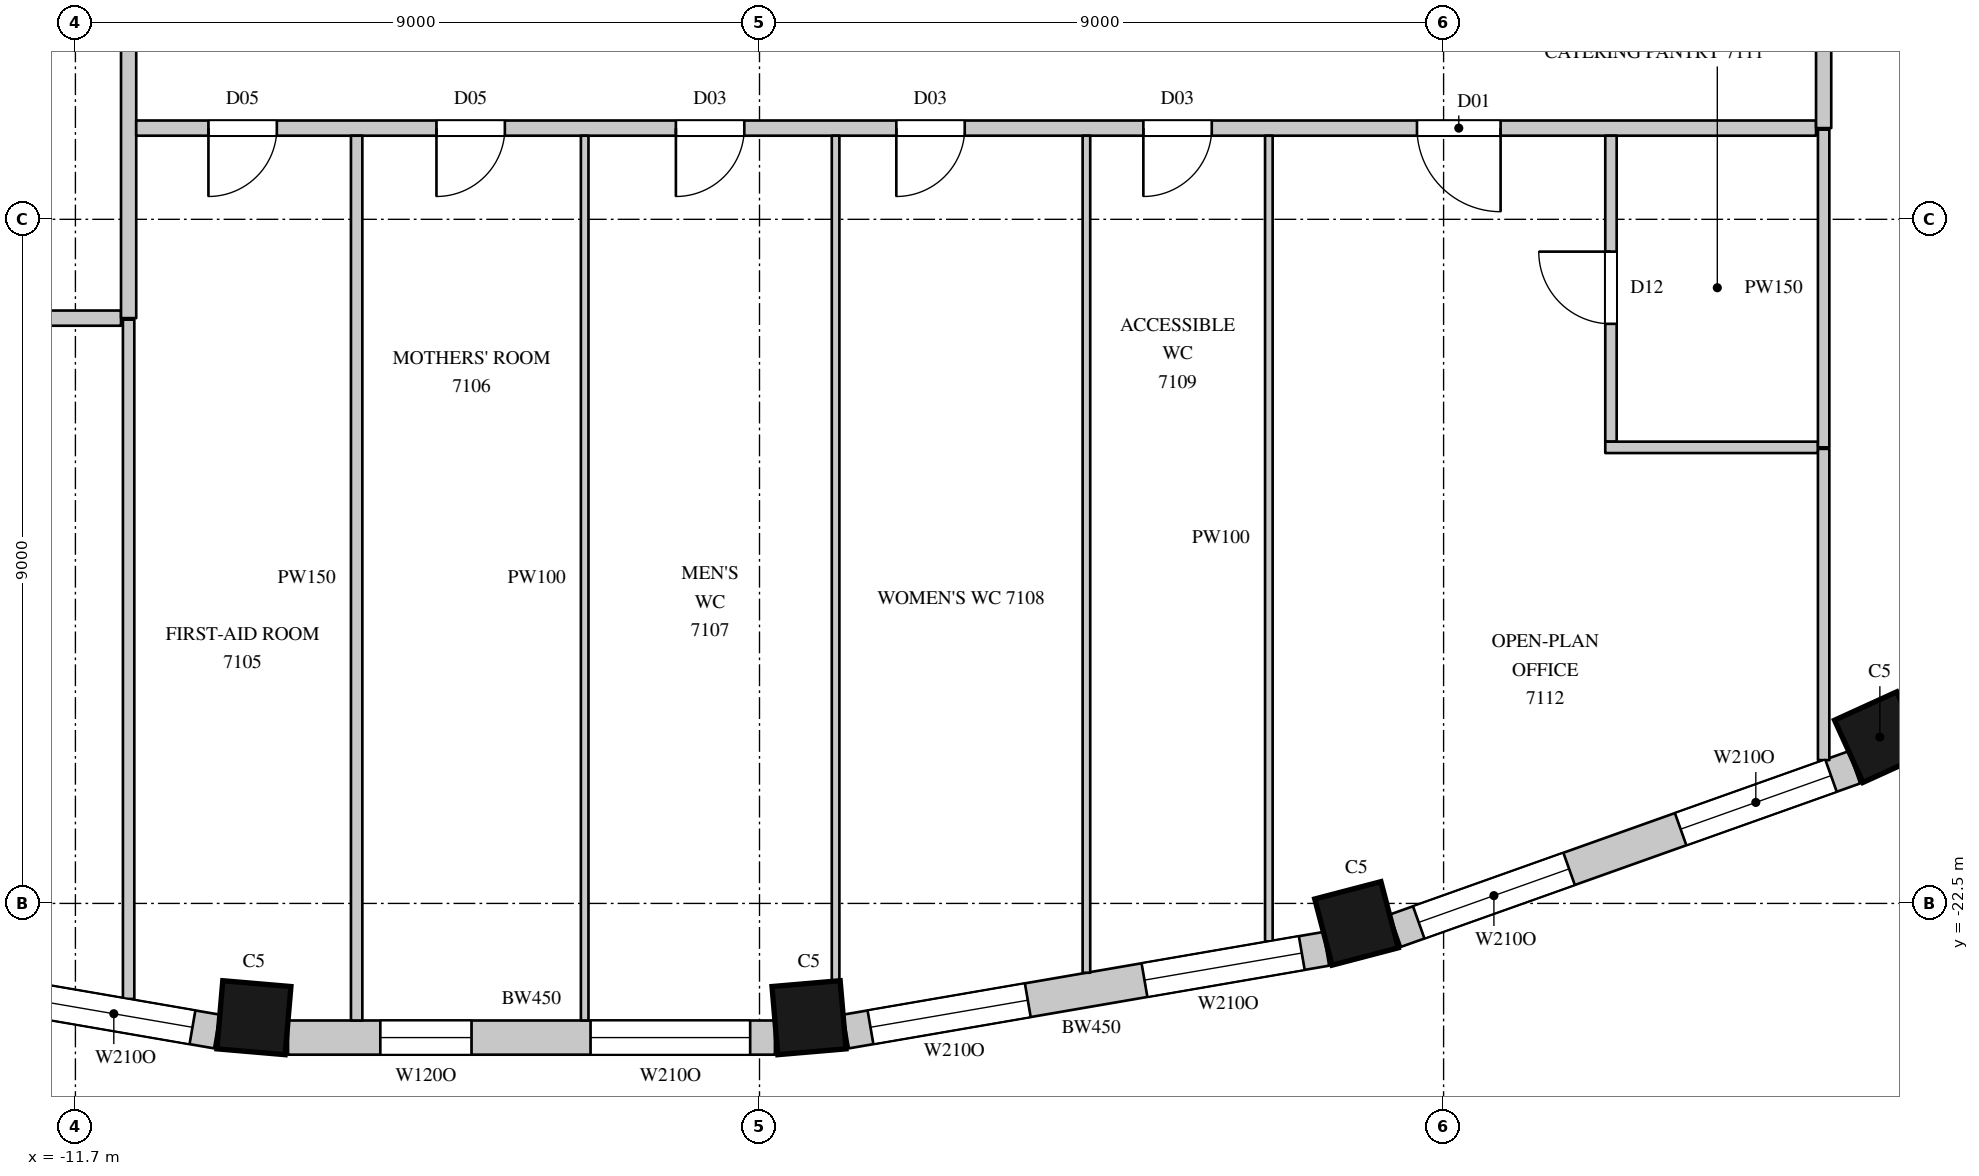
"""IFC4 building model, lengths in metres.
Left out: names, types, materials, properties, quantities, classifications, styles, units other than length and angle.
Written with IfcOpenShell. Run it as: python <this file> out.ifc"""

import sys

from ifc_helpers import new_model, si_unit, direction, frame, frame_2d, origin, origin_2d, place, context, subcontext, project, spatial, rectangle, extrude, element, fill, save


model = new_model("IFC4")
c1 = context("Model", 3, precision=1e-05, world=origin(), true_north=direction((0.0, 1.0)))
c2 = subcontext(c1, "Body", "Model", "MODEL_VIEW")
j1 = project(units=[si_unit("LENGTHUNIT", "METRE"), si_unit("PLANEANGLEUNIT", "RADIAN")], contexts=[c1])
p1 = place(None, origin())
s1 = spatial("IfcSite", under=j1, at=p1, CompositionType="ELEMENT")
p2 = place(p1, origin())
s2 = spatial("IfcBuilding", under=s1, at=p2, CompositionType="ELEMENT")
p3 = place(p2, frame((0.0, 0.0, 313.1)))
s3 = spatial("IfcBuildingStorey", under=s2, at=p3, CompositionType="ELEMENT", Elevation=313.1)
for number, where, z_axis, x_axis in (
    (1, (-9.351, -24.003, 0.0), (0.0, 0.0, 1.0), (0.996, -0.085, 0.0)),
    (2, (-2.049, -24.003, 0.0), (0.0, 0.0, 1.0), (0.996, 0.085, 0.0)),
    (3, (5.154, -22.763, 0.0), (0.0, 0.0, 1.0), (0.967, 0.253, 0.0)),
    (4, (12.04, -20.312, 0.0), (0.0, 0.0, 1.0), (0.91, 0.415, 0.0)),
):
    element("IfcColumn", number, at=place(p3, frame(where, z_axis=z_axis, x_axis=x_axis)), inside=s3, PredefinedType="COLUMN", context=c2, shape_type="SweptSolid", body=[
        extrude(rectangle(XDim=0.9, YDim=0.9, at=origin_2d()), origin(), (0.0, 0.0, 1.0), 4.1),
    ])
p4 = place(p3, frame((-16.157, -23.097, 0.0), z_axis=(0.0, 0.0, 1.0), x_axis=(0.985502073964, -0.169663379113, 0.0)))
e5 = element("IfcWall", 5, at=p4, inside=s3, PredefinedType="SOLIDWALL", context=c2, shape_type="SweptSolid", body=[
    extrude(rectangle(XDim=6.412, YDim=0.45, at=frame_2d((3.206, 0.0))), origin(), (0.0, 0.0, 1.0), 3.8),
])
p5 = place(p4, frame((0.327, 0.0, 1.05)))
e6 = element("IfcOpeningElement", 6, at=p5, cuts=e5, PredefinedType="OPENING", context=c2, shape_type="SweptSolid", body=[
    extrude(rectangle(XDim=2.1, YDim=2.4, at=frame_2d((1.05, 1.2))), frame((0.0, 0.235, 0.0), z_axis=(0.0, -1.0, 0.0), x_axis=(1.0, 0.0, 0.0)), (0.0, 0.0, 1.0), 0.47),
])
p6 = place(p4, frame((3.985, 0.0, 1.05)))
e7 = element("IfcOpeningElement", 7, at=p6, cuts=e5, PredefinedType="OPENING", context=c2, shape_type="SweptSolid", body=[
    extrude(rectangle(XDim=2.1, YDim=2.4, at=frame_2d((1.05, 1.2))), frame((0.0, 0.235, 0.0), z_axis=(0.0, -1.0, 0.0), x_axis=(1.0, 0.0, 0.0)), (0.0, 0.0, 1.0), 0.47),
])
p7 = place(p3, frame((-8.903, -24.265, 0.0), z_axis=(0.0, 0.0, 1.0), x_axis=(1.0, 0.0, 0.0)))
e8 = element("IfcWall", 8, at=p7, inside=s3, PredefinedType="SOLIDWALL", context=c2, shape_type="SweptSolid", body=[
    extrude(rectangle(XDim=6.406, YDim=0.45, at=frame_2d((3.203, 0.0))), origin(), (0.0, 0.0, 1.0), 3.8),
])
p8 = place(p7, frame((3.98, 0.0, 1.05)))
e9 = element("IfcOpeningElement", 9, at=p8, cuts=e8, PredefinedType="OPENING", context=c2, shape_type="SweptSolid", body=[
    extrude(rectangle(XDim=2.1, YDim=2.4, at=frame_2d((1.05, 1.2))), frame((0.0, 0.235, 0.0), z_axis=(0.0, -1.0, 0.0), x_axis=(1.0, 0.0, 0.0)), (0.0, 0.0, 1.0), 0.47),
])
p9 = place(p7, frame((1.214, 0.0, 1.05)))
e10 = element("IfcOpeningElement", 10, at=p9, cuts=e8, PredefinedType="OPENING", context=c2, shape_type="SweptSolid", body=[
    extrude(rectangle(XDim=1.2, YDim=2.4, at=frame_2d((0.6, 1.2))), frame((0.0, 0.235, 0.0), z_axis=(0.0, -1.0, 0.0), x_axis=(1.0, 0.0, 0.0)), (0.0, 0.0, 1.0), 0.47),
])
p10 = place(p3, frame((-1.562, -24.185, 0.0), z_axis=(0.0, 0.0, 1.0), x_axis=(0.985502073964, 0.169663379113, 0.0)))
e11 = element("IfcWall", 11, at=p10, inside=s3, PredefinedType="SOLIDWALL", context=c2, shape_type="SweptSolid", body=[
    extrude(rectangle(XDim=6.412, YDim=0.45, at=frame_2d((3.206, 0.0))), origin(), (0.0, 0.0, 1.0), 3.8),
])
p11 = place(p10, frame((0.327, 0.0, 1.05)))
e12 = element("IfcOpeningElement", 12, at=p11, cuts=e11, PredefinedType="OPENING", context=c2, shape_type="SweptSolid", body=[
    extrude(rectangle(XDim=2.1, YDim=2.4, at=frame_2d((1.05, 1.2))), frame((0.0, 0.235, 0.0), z_axis=(0.0, -1.0, 0.0), x_axis=(1.0, 0.0, 0.0)), (0.0, 0.0, 1.0), 0.47),
])
p12 = place(p10, frame((3.985, 0.0, 1.05)))
e13 = element("IfcOpeningElement", 13, at=p12, cuts=e11, PredefinedType="OPENING", context=c2, shape_type="SweptSolid", body=[
    extrude(rectangle(XDim=2.1, YDim=2.4, at=frame_2d((1.05, 1.2))), frame((0.0, 0.235, 0.0), z_axis=(0.0, -1.0, 0.0), x_axis=(1.0, 0.0, 0.0)), (0.0, 0.0, 1.0), 0.47),
])
p13 = place(p3, frame((5.665, -22.859, 0.0), z_axis=(0.0, 0.0, 1.0), x_axis=(0.942108340262, 0.335308626803, 0.0)))
e14 = element("IfcWall", 14, at=p13, inside=s3, PredefinedType="SOLIDWALL", context=c2, shape_type="SweptSolid", body=[
    extrude(rectangle(XDim=6.412, YDim=0.45, at=frame_2d((3.206, 0.0))), origin(), (0.0, 0.0, 1.0), 3.8),
])
p14 = place(p13, frame((0.327, 0.0, 1.05)))
e15 = element("IfcOpeningElement", 15, at=p14, cuts=e14, PredefinedType="OPENING", context=c2, shape_type="SweptSolid", body=[
    extrude(rectangle(XDim=2.1, YDim=2.4, at=frame_2d((1.05, 1.2))), frame((0.0, 0.235, 0.0), z_axis=(0.0, -1.0, 0.0), x_axis=(1.0, 0.0, 0.0)), (0.0, 0.0, 1.0), 0.47),
])
p15 = place(p13, frame((3.985, 0.0, 1.05)))
e16 = element("IfcOpeningElement", 16, at=p15, cuts=e14, PredefinedType="OPENING", context=c2, shape_type="SweptSolid", body=[
    extrude(rectangle(XDim=2.1, YDim=2.4, at=frame_2d((1.05, 1.2))), frame((0.0, 0.235, 0.0), z_axis=(0.0, -1.0, 0.0), x_axis=(1.0, 0.0, 0.0)), (0.0, 0.0, 1.0), 0.47),
])
p16 = place(p3, frame((-13.97, -14.8, 0.0), z_axis=(0.0, 0.0, 1.0), x_axis=(1.0, 0.0, 0.0)))
e17 = element("IfcWall", 17, at=p16, inside=s3, PredefinedType="PARTITIONING", context=c2, shape_type="SweptSolid", body=[
    extrude(rectangle(XDim=2.87, YDim=0.2, at=frame_2d((1.435, 0.0))), origin(), (0.0, 0.0, 1.0), 3.8),
])
p17 = place(p3, frame((-11.0, -14.8, 0.0), z_axis=(0.0, 0.0, 1.0), x_axis=(0.0, 1.0, 0.0)))
e18 = element("IfcWall", 18, at=p17, inside=s3, PredefinedType="PARTITIONING", context=c2, shape_type="SweptSolid", body=[
    extrude(rectangle(XDim=29.5, YDim=0.2, at=frame_2d((14.75, 0.0))), origin(), (0.0, 0.0, 1.0), 3.8),
])
p18 = place(p17, frame((14.05, 0.0, 0.0)))
e19 = element("IfcOpeningElement", 19, at=p18, cuts=e18, PredefinedType="OPENING", context=c2, shape_type="SweptSolid", body=[
    extrude(rectangle(XDim=1.5, YDim=2.4, at=frame_2d((0.75, 1.2))), frame((0.0, 0.11, 0.0), z_axis=(0.0, -1.0, 0.0), x_axis=(1.0, 0.0, 0.0)), (0.0, 0.0, 1.0), 0.22),
])
p19 = place(p3, frame((-10.9, -12.3, 0.0), z_axis=(0.0, 0.0, 1.0), x_axis=(1.0, 0.0, 0.0)))
e20 = element("IfcWall", 20, at=p19, inside=s3, PredefinedType="PARTITIONING", context=c2, shape_type="SweptSolid", body=[
    extrude(rectangle(XDim=22.1, YDim=0.2, at=frame_2d((11.05, 0.0))), origin(), (0.0, 0.0, 1.0), 3.8),
])
p20 = place(p19, frame((0.95, 0.0, 0.0)))
e21 = element("IfcOpeningElement", 21, at=p20, cuts=e20, PredefinedType="OPENING", context=c2, shape_type="SweptSolid", body=[
    extrude(rectangle(XDim=0.9, YDim=2.2, at=frame_2d((0.45, 1.1))), frame((0.0, 0.11, 0.0), z_axis=(0.0, -1.0, 0.0), x_axis=(1.0, 0.0, 0.0)), (0.0, 0.0, 1.0), 0.22),
])
p21 = place(p19, frame((3.95, 0.0, 0.0)))
e22 = element("IfcOpeningElement", 22, at=p21, cuts=e20, PredefinedType="OPENING", context=c2, shape_type="SweptSolid", body=[
    extrude(rectangle(XDim=0.9, YDim=2.2, at=frame_2d((0.45, 1.1))), frame((0.0, 0.11, 0.0), z_axis=(0.0, -1.0, 0.0), x_axis=(1.0, 0.0, 0.0)), (0.0, 0.0, 1.0), 0.22),
])
p22 = place(p19, frame((7.1, 0.0, 0.0)))
e23 = element("IfcOpeningElement", 23, at=p22, cuts=e20, PredefinedType="OPENING", context=c2, shape_type="SweptSolid", body=[
    extrude(rectangle(XDim=0.9, YDim=2.2, at=frame_2d((0.45, 1.1))), frame((0.0, 0.11, 0.0), z_axis=(0.0, -1.0, 0.0), x_axis=(1.0, 0.0, 0.0)), (0.0, 0.0, 1.0), 0.22),
])
p23 = place(p19, frame((10.0, 0.0, 0.0)))
e24 = element("IfcOpeningElement", 24, at=p23, cuts=e20, PredefinedType="OPENING", context=c2, shape_type="SweptSolid", body=[
    extrude(rectangle(XDim=0.9, YDim=2.2, at=frame_2d((0.45, 1.1))), frame((0.0, 0.11, 0.0), z_axis=(0.0, -1.0, 0.0), x_axis=(1.0, 0.0, 0.0)), (0.0, 0.0, 1.0), 0.22),
])
p24 = place(p19, frame((13.25, 0.0, 0.0)))
e25 = element("IfcOpeningElement", 25, at=p24, cuts=e20, PredefinedType="OPENING", context=c2, shape_type="SweptSolid", body=[
    extrude(rectangle(XDim=0.9, YDim=2.2, at=frame_2d((0.45, 1.1))), frame((0.0, 0.11, 0.0), z_axis=(0.0, -1.0, 0.0), x_axis=(1.0, 0.0, 0.0)), (0.0, 0.0, 1.0), 0.22),
])
p25 = place(p19, frame((16.85, 0.0, 0.0)))
e26 = element("IfcOpeningElement", 26, at=p25, cuts=e20, PredefinedType="OPENING", context=c2, shape_type="SweptSolid", body=[
    extrude(rectangle(XDim=1.1, YDim=2.4, at=frame_2d((0.55, 1.2))), frame((0.0, 0.11, 0.0), z_axis=(0.0, -1.0, 0.0), x_axis=(1.0, 0.0, 0.0)), (0.0, 0.0, 1.0), 0.22),
])
p26 = place(p3, frame((11.3, -12.3, 0.0), z_axis=(0.0, 0.0, 1.0), x_axis=(0.0, 1.0, 0.0)))
e27 = element("IfcWall", 27, at=p26, inside=s3, PredefinedType="PARTITIONING", context=c2, shape_type="SweptSolid", body=[
    extrude(rectangle(XDim=24.5, YDim=0.2, at=frame_2d((12.25, 0.0))), origin(), (0.0, 0.0, 1.0), 3.8),
])
p27 = place(p26, frame((10.15, 0.0, 0.0)))
e28 = element("IfcOpeningElement", 28, at=p27, cuts=e27, PredefinedType="OPENING", context=c2, shape_type="SweptSolid", body=[
    extrude(rectangle(XDim=1.5, YDim=2.4, at=frame_2d((0.75, 1.2))), frame((0.0, 0.11, 0.0), z_axis=(0.0, -1.0, 0.0), x_axis=(1.0, 0.0, 0.0)), (0.0, 0.0, 1.0), 0.22),
])
p28 = place(p3, frame((-11.0, -23.757, 0.0), z_axis=(0.0, 0.0, 1.0), x_axis=(0.0, 1.0, 0.0)))
e29 = element("IfcWall", 29, at=p28, inside=s3, PredefinedType="PARTITIONING", context=c2, shape_type="SweptSolid", body=[
    extrude(rectangle(XDim=8.937, YDim=0.15, at=frame_2d((4.468, 0.0))), origin(), (0.0, 0.0, 1.0), 3.8),
])
p29 = place(p3, frame((-8.0, -24.04, 0.0), z_axis=(0.0, 0.0, 1.0), x_axis=(0.0, 1.0, 0.0)))
e30 = element("IfcWall", 30, at=p29, inside=s3, PredefinedType="PARTITIONING", context=c2, shape_type="SweptSolid", body=[
    extrude(rectangle(XDim=11.64, YDim=0.15, at=frame_2d((5.82, 0.0))), origin(), (0.0, 0.0, 1.0), 3.8),
])
p30 = place(p3, frame((8.502, -16.425, 0.0), z_axis=(0.0, 0.0, 1.0), x_axis=(0.0, 1.0, 0.0)))
e31 = element("IfcWall", 31, at=p30, inside=s3, PredefinedType="PARTITIONING", context=c2, shape_type="SweptSolid", body=[
    extrude(rectangle(XDim=4.025, YDim=0.15, at=frame_2d((2.013, 0.0))), origin(), (0.0, 0.0, 1.0), 3.8),
])
p31 = place(p30, frame((1.55, 0.0, 0.0)))
e32 = element("IfcOpeningElement", 32, at=p31, cuts=e31, PredefinedType="OPENING", context=c2, shape_type="SweptSolid", body=[
    extrude(rectangle(XDim=0.95, YDim=2.2, at=frame_2d((0.475, 1.1))), frame((0.0, 0.085, 0.0), z_axis=(0.0, -1.0, 0.0), x_axis=(1.0, 0.0, 0.0)), (0.0, 0.0, 1.0), 0.17),
])
p32 = place(p3, frame((8.427, -16.5, 0.0), z_axis=(0.0, 0.0, 1.0), x_axis=(1.0, 0.0, 0.0)))
e33 = element("IfcWall", 33, at=p32, inside=s3, PredefinedType="PARTITIONING", context=c2, shape_type="SweptSolid", body=[
    extrude(rectangle(XDim=2.798, YDim=0.15, at=frame_2d((1.399, 0.0))), origin(), (0.0, 0.0, 1.0), 3.8),
])
p33 = place(p3, frame((11.3, -20.615, 0.0), z_axis=(0.0, 0.0, 1.0), x_axis=(0.0, 1.0, 0.0)))
e34 = element("IfcWall", 34, at=p33, inside=s3, PredefinedType="PARTITIONING", context=c2, shape_type="SweptSolid", body=[
    extrude(rectangle(XDim=4.095, YDim=0.15, at=frame_2d((2.047, 0.0))), origin(), (0.0, 0.0, 1.0), 3.8),
])
p34 = place(p3, frame((11.3, -16.5, 0.0), z_axis=(0.0, 0.0, 1.0), x_axis=(0.0, 1.0, 0.0)))
e35 = element("IfcWall", 35, at=p34, inside=s3, PredefinedType="PARTITIONING", context=c2, shape_type="SweptSolid", body=[
    extrude(rectangle(XDim=4.18, YDim=0.15, at=frame_2d((2.09, 0.0))), origin(), (0.0, 0.0, 1.0), 3.8),
])
p35 = place(p3, frame((-5.0, -24.04, 0.0), z_axis=(0.0, 0.0, 1.0), x_axis=(0.0, 1.0, 0.0)))
e36 = element("IfcWall", 36, at=p35, inside=s3, PredefinedType="PARTITIONING", context=c2, shape_type="SweptSolid", body=[
    extrude(rectangle(XDim=11.64, YDim=0.1, at=frame_2d((5.82, 0.0))), origin(), (0.0, 0.0, 1.0), 3.8),
])
p36 = place(p3, frame((-1.699, -23.522, 0.0), z_axis=(0.0, 0.0, 1.0), x_axis=(0.0, 1.0, 0.0)))
e37 = element("IfcWall", 37, at=p36, inside=s3, PredefinedType="PARTITIONING", context=c2, shape_type="SweptSolid", body=[
    extrude(rectangle(XDim=11.122, YDim=0.1, at=frame_2d((5.561, 0.0))), origin(), (0.0, 0.0, 1.0), 3.8),
])
p37 = place(p3, frame((1.601, -23.412, 0.0), z_axis=(0.0, 0.0, 1.0), x_axis=(0.0, 1.0, 0.0)))
e38 = element("IfcWall", 38, at=p37, inside=s3, PredefinedType="PARTITIONING", context=c2, shape_type="SweptSolid", body=[
    extrude(rectangle(XDim=11.012, YDim=0.1, at=frame_2d((5.506, 0.0))), origin(), (0.0, 0.0, 1.0), 3.8),
])
p38 = place(p3, frame((4.001, -22.999, 0.0), z_axis=(0.0, 0.0, 1.0), x_axis=(0.0, 1.0, 0.0)))
e39 = element("IfcWall", 39, at=p38, inside=s3, PredefinedType="PARTITIONING", context=c2, shape_type="SweptSolid", body=[
    extrude(rectangle(XDim=10.599, YDim=0.1, at=frame_2d((5.3, 0.0))), origin(), (0.0, 0.0, 1.0), 3.8),
])
p39 = place(p6, origin())
e40 = element("IfcWindow", 40, at=p39, inside=s3, PartitioningType="SINGLE_PANEL", PredefinedType="WINDOW", context=c2, shape_type="SweptSolid", body=[
    extrude(rectangle(XDim=2.1, YDim=2.4, at=frame_2d((1.05, 1.2))), frame((0.0, 0.135, 0.0), z_axis=(0.0, -1.0, 0.0), x_axis=(1.0, 0.0, 0.0)), (0.0, 0.0, 1.0), 0.06),
])
fill(e7, e40)
p40 = place(p8, origin())
e41 = element("IfcWindow", 41, at=p40, inside=s3, PartitioningType="SINGLE_PANEL", PredefinedType="WINDOW", context=c2, shape_type="SweptSolid", body=[
    extrude(rectangle(XDim=2.1, YDim=2.4, at=frame_2d((1.05, 1.2))), frame((0.0, 0.135, 0.0), z_axis=(0.0, -1.0, 0.0), x_axis=(1.0, 0.0, 0.0)), (0.0, 0.0, 1.0), 0.06),
])
fill(e9, e41)
p41 = place(p11, origin())
e42 = element("IfcWindow", 42, at=p41, inside=s3, PartitioningType="SINGLE_PANEL", PredefinedType="WINDOW", context=c2, shape_type="SweptSolid", body=[
    extrude(rectangle(XDim=2.1, YDim=2.4, at=frame_2d((1.05, 1.2))), frame((0.0, 0.135, 0.0), z_axis=(0.0, -1.0, 0.0), x_axis=(1.0, 0.0, 0.0)), (0.0, 0.0, 1.0), 0.06),
])
fill(e12, e42)
p42 = place(p12, origin())
e43 = element("IfcWindow", 43, at=p42, inside=s3, PartitioningType="SINGLE_PANEL", PredefinedType="WINDOW", context=c2, shape_type="SweptSolid", body=[
    extrude(rectangle(XDim=2.1, YDim=2.4, at=frame_2d((1.05, 1.2))), frame((0.0, 0.135, 0.0), z_axis=(0.0, -1.0, 0.0), x_axis=(1.0, 0.0, 0.0)), (0.0, 0.0, 1.0), 0.06),
])
fill(e13, e43)
p43 = place(p14, origin())
e44 = element("IfcWindow", 44, at=p43, inside=s3, PartitioningType="SINGLE_PANEL", PredefinedType="WINDOW", context=c2, shape_type="SweptSolid", body=[
    extrude(rectangle(XDim=2.1, YDim=2.4, at=frame_2d((1.05, 1.2))), frame((0.0, 0.135, 0.0), z_axis=(0.0, -1.0, 0.0), x_axis=(1.0, 0.0, 0.0)), (0.0, 0.0, 1.0), 0.06),
])
fill(e15, e44)
p44 = place(p15, origin())
e45 = element("IfcWindow", 45, at=p44, inside=s3, PartitioningType="SINGLE_PANEL", PredefinedType="WINDOW", context=c2, shape_type="SweptSolid", body=[
    extrude(rectangle(XDim=2.1, YDim=2.4, at=frame_2d((1.05, 1.2))), frame((0.0, 0.135, 0.0), z_axis=(0.0, -1.0, 0.0), x_axis=(1.0, 0.0, 0.0)), (0.0, 0.0, 1.0), 0.06),
])
fill(e16, e45)
p45 = place(p20, origin())
e46 = element("IfcDoor", 46, at=p45, inside=s3, OperationType="SINGLE_SWING_RIGHT", PredefinedType="DOOR", context=c2, shape_type="SweptSolid", body=[
    extrude(rectangle(XDim=0.9, YDim=2.2, at=frame_2d((0.45, 1.1))), frame((0.0, 0.025, 0.0), z_axis=(0.0, -1.0, 0.0), x_axis=(1.0, 0.0, 0.0)), (0.0, 0.0, 1.0), 0.05),
])
fill(e21, e46)
p46 = place(p21, origin())
e47 = element("IfcDoor", 47, at=p46, inside=s3, OperationType="SINGLE_SWING_RIGHT", PredefinedType="DOOR", context=c2, shape_type="SweptSolid", body=[
    extrude(rectangle(XDim=0.9, YDim=2.2, at=frame_2d((0.45, 1.1))), frame((0.0, 0.025, 0.0), z_axis=(0.0, -1.0, 0.0), x_axis=(1.0, 0.0, 0.0)), (0.0, 0.0, 1.0), 0.05),
])
fill(e22, e47)
p47 = place(p22, origin())
e48 = element("IfcDoor", 48, at=p47, inside=s3, OperationType="SINGLE_SWING_RIGHT", PredefinedType="DOOR", context=c2, shape_type="SweptSolid", body=[
    extrude(rectangle(XDim=0.9, YDim=2.2, at=frame_2d((0.45, 1.1))), frame((0.0, 0.025, 0.0), z_axis=(0.0, -1.0, 0.0), x_axis=(1.0, 0.0, 0.0)), (0.0, 0.0, 1.0), 0.05),
])
fill(e23, e48)
p48 = place(p23, origin())
e49 = element("IfcDoor", 49, at=p48, inside=s3, OperationType="SINGLE_SWING_RIGHT", PredefinedType="DOOR", context=c2, shape_type="SweptSolid", body=[
    extrude(rectangle(XDim=0.9, YDim=2.2, at=frame_2d((0.45, 1.1))), frame((0.0, 0.025, 0.0), z_axis=(0.0, -1.0, 0.0), x_axis=(1.0, 0.0, 0.0)), (0.0, 0.0, 1.0), 0.05),
])
fill(e24, e49)
p49 = place(p24, origin())
e50 = element("IfcDoor", 50, at=p49, inside=s3, OperationType="SINGLE_SWING_RIGHT", PredefinedType="DOOR", context=c2, shape_type="SweptSolid", body=[
    extrude(rectangle(XDim=0.9, YDim=2.2, at=frame_2d((0.45, 1.1))), frame((0.0, 0.025, 0.0), z_axis=(0.0, -1.0, 0.0), x_axis=(1.0, 0.0, 0.0)), (0.0, 0.0, 1.0), 0.05),
])
fill(e25, e50)
p50 = place(p25, origin())
e51 = element("IfcDoor", 51, at=p50, inside=s3, OperationType="SINGLE_SWING_LEFT", PredefinedType="DOOR", context=c2, shape_type="SweptSolid", body=[
    extrude(rectangle(XDim=1.1, YDim=2.4, at=frame_2d((0.55, 1.2))), frame((0.0, 0.025, 0.0), z_axis=(0.0, -1.0, 0.0), x_axis=(1.0, 0.0, 0.0)), (0.0, 0.0, 1.0), 0.05),
])
fill(e26, e51)
p51 = place(p31, origin())
e52 = element("IfcDoor", 52, at=p51, inside=s3, OperationType="SINGLE_SWING_RIGHT", PredefinedType="DOOR", context=c2, shape_type="SweptSolid", body=[
    extrude(rectangle(XDim=0.95, YDim=2.2, at=frame_2d((0.475, 1.1))), frame((0.0, 0.025, 0.0), z_axis=(0.0, -1.0, 0.0), x_axis=(1.0, 0.0, 0.0)), (0.0, 0.0, 1.0), 0.05),
])
fill(e32, e52)
p52 = place(p9, origin())
e53 = element("IfcWindow", 53, at=p52, inside=s3, PartitioningType="SINGLE_PANEL", PredefinedType="WINDOW", context=c2, shape_type="SweptSolid", body=[
    extrude(rectangle(XDim=1.2, YDim=2.4, at=frame_2d((0.6, 1.2))), frame((0.0, 0.135, 0.0), z_axis=(0.0, -1.0, 0.0), x_axis=(1.0, 0.0, 0.0)), (0.0, 0.0, 1.0), 0.06),
])
fill(e10, e53)
save(model, sys.argv[1])
